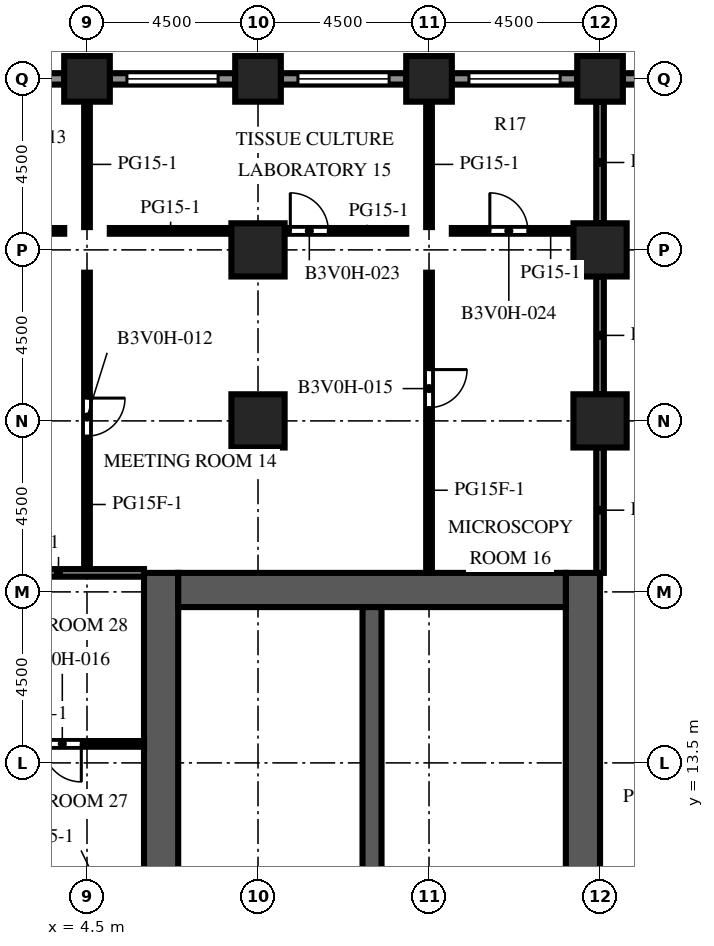
"""IFC4 building model, lengths in metres.
Left out: names, types, materials, properties, quantities, classifications, styles, units other than length and angle.
Written with IfcOpenShell. Run it as: python <this file> out.ifc"""

import sys

from ifc_helpers import new_model, si_unit, direction, frame, frame_2d, origin, origin_2d, place, context, subcontext, project, spatial, rectangle, extrude, element, fill, save


model = new_model("IFC4")
c1 = context("Model", 3, precision=1e-05, world=origin(), true_north=direction((0.0, 1.0)))
c2 = subcontext(c1, "Body", "Model", "MODEL_VIEW")
j1 = project(units=[si_unit("LENGTHUNIT", "METRE"), si_unit("PLANEANGLEUNIT", "RADIAN")], contexts=[c1])
p1 = place(None, origin())
s1 = spatial("IfcSite", under=j1, at=p1, CompositionType="ELEMENT")
p2 = place(p1, origin())
s2 = spatial("IfcBuilding", under=s1, at=p2, CompositionType="ELEMENT")
p3 = place(p2, frame((0.0, 0.0, 82.0)))
s3 = spatial("IfcBuildingStorey", under=s2, at=p3, CompositionType="ELEMENT", Elevation=82.0)
for number, where, z_axis, x_axis in (
    (1, (4.5, 31.5, -0.45), (0.0, 0.0, 1.0), (1.0, 0.0, 0.0)),
    (2, (9.0, 31.5, -0.45), (0.0, 0.0, 1.0), (1.0, 0.0, 0.0)),
    (3, (13.5, 31.5, -0.45), (0.0, 0.0, 1.0), (1.0, 0.0, 0.0)),
    (4, (18.0, 31.5, -0.45), (0.0, 0.0, 1.0), (1.0, 0.0, 0.0)),
):
    element("IfcColumn", number, at=place(p3, frame(where, z_axis=z_axis, x_axis=x_axis)), inside=s3, PredefinedType="COLUMN", context=c2, shape_type="SweptSolid", body=[
        extrude(rectangle(XDim=1.2, YDim=1.2, at=origin_2d()), origin(), (0.0, 0.0, 1.0), 4.55),
    ])
for number, where, z_axis, x_axis in (
    (5, (9.0, 22.5, -0.45), (0.0, 0.0, 1.0), (1.0, 0.0, 0.0)),
    (6, (9.0, 27.0, -0.45), (0.0, 0.0, 1.0), (1.0, 0.0, 0.0)),
    (7, (18.0, 22.5, -0.45), (0.0, 0.0, 1.0), (1.0, 0.0, 0.0)),
    (8, (18.0, 27.0, -0.45), (0.0, 0.0, 1.0), (1.0, 0.0, 0.0)),
):
    element("IfcColumn", number, at=place(p3, frame(where, z_axis=z_axis, x_axis=x_axis)), inside=s3, PredefinedType="COLUMN", context=c2, shape_type="SweptSolid", body=[
        extrude(rectangle(XDim=1.4, YDim=1.4, at=origin_2d()), origin(), (0.0, 0.0, 1.0), 4.55),
    ])
p4 = place(p3, frame((6.45, -9.0, 0.0), z_axis=(0.0, 0.0, 1.0), x_axis=(0.0, 1.0, 0.0)))
e9 = element("IfcWall", 9, at=p4, inside=s3, PredefinedType="SHEAR", context=c2, shape_type="SweptSolid", body=[
    extrude(rectangle(XDim=27.5, YDim=0.9, at=frame_2d((13.75, 0.0))), origin(), (0.0, 0.0, 1.0), 4.1),
])
p5 = place(p4, frame((12.55, 0.0, 0.0)))
e10 = element("IfcOpeningElement", 10, at=p5, cuts=e9, PredefinedType="OPENING", context=c2, shape_type="SweptSolid", body=[
    extrude(rectangle(XDim=2.4, YDim=2.4, at=frame_2d((1.2, 1.2))), frame((0.0, 0.46, 0.0), z_axis=(0.0, -1.0, 0.0), x_axis=(1.0, 0.0, 0.0)), (0.0, 0.0, 1.0), 0.92),
])
p6 = place(p4, frame((5.445, 0.0, 0.0)))
e11 = element("IfcOpeningElement", 11, at=p6, cuts=e9, PredefinedType="OPENING", context=c2, shape_type="SweptSolid", body=[
    extrude(rectangle(XDim=1.2, YDim=2.1, at=frame_2d((0.6, 1.05))), frame((0.0, 0.46, 0.0), z_axis=(0.0, -1.0, 0.0), x_axis=(1.0, 0.0, 0.0)), (0.0, 0.0, 1.0), 0.92),
])
p7 = place(p4, frame((19.485, 0.0, 0.0)))
e12 = element("IfcOpeningElement", 12, at=p7, cuts=e9, PredefinedType="OPENING", context=c2, shape_type="SweptSolid", body=[
    extrude(rectangle(XDim=1.0, YDim=2.1, at=frame_2d((0.5, 1.05))), frame((0.0, 0.46, 0.0), z_axis=(0.0, -1.0, 0.0), x_axis=(1.0, 0.0, 0.0)), (0.0, 0.0, 1.0), 0.92),
])
p8 = place(p4, frame((21.139, 0.0, 0.0)))
e13 = element("IfcOpeningElement", 13, at=p8, cuts=e9, PredefinedType="OPENING", context=c2, shape_type="SweptSolid", body=[
    extrude(rectangle(XDim=1.0, YDim=2.1, at=frame_2d((0.5, 1.05))), frame((0.0, 0.46, 0.0), z_axis=(0.0, -1.0, 0.0), x_axis=(1.0, 0.0, 0.0)), (0.0, 0.0, 1.0), 0.92),
])
p9 = place(p4, frame((23.16, 0.0, 0.0)))
e14 = element("IfcOpeningElement", 14, at=p9, cuts=e9, PredefinedType="OPENING", context=c2, shape_type="SweptSolid", body=[
    extrude(rectangle(XDim=1.0, YDim=2.1, at=frame_2d((0.5, 1.05))), frame((0.0, 0.46, 0.0), z_axis=(0.0, -1.0, 0.0), x_axis=(1.0, 0.0, 0.0)), (0.0, 0.0, 1.0), 0.92),
])
p10 = place(p4, frame((25.181, 0.0, 0.0)))
e15 = element("IfcOpeningElement", 15, at=p10, cuts=e9, PredefinedType="OPENING", context=c2, shape_type="SweptSolid", body=[
    extrude(rectangle(XDim=1.0, YDim=2.1, at=frame_2d((0.5, 1.05))), frame((0.0, 0.46, 0.0), z_axis=(0.0, -1.0, 0.0), x_axis=(1.0, 0.0, 0.0)), (0.0, 0.0, 1.0), 0.92),
])
p11 = place(p3, frame((17.55, -9.0, 0.0), z_axis=(0.0, 0.0, 1.0), x_axis=(0.0, 1.0, 0.0)))
e16 = element("IfcWall", 16, at=p11, inside=s3, PredefinedType="SHEAR", context=c2, shape_type="SweptSolid", body=[
    extrude(rectangle(XDim=27.5, YDim=0.9, at=frame_2d((13.75, 0.0))), origin(), (0.0, 0.0, 1.0), 4.1),
])
p12 = place(p11, frame((12.55, 0.0, 0.0)))
e17 = element("IfcOpeningElement", 17, at=p12, cuts=e16, PredefinedType="OPENING", context=c2, shape_type="SweptSolid", body=[
    extrude(rectangle(XDim=2.4, YDim=2.4, at=frame_2d((1.2, 1.2))), frame((0.0, 0.46, 0.0), z_axis=(0.0, -1.0, 0.0), x_axis=(1.0, 0.0, 0.0)), (0.0, 0.0, 1.0), 0.92),
])
p13 = place(p11, frame((6.825, 0.0, 0.0)))
e18 = element("IfcOpeningElement", 18, at=p13, cuts=e16, PredefinedType="OPENING", context=c2, shape_type="SweptSolid", body=[
    extrude(rectangle(XDim=1.2, YDim=2.1, at=frame_2d((0.6, 1.05))), frame((0.0, 0.46, 0.0), z_axis=(0.0, -1.0, 0.0), x_axis=(1.0, 0.0, 0.0)), (0.0, 0.0, 1.0), 0.92),
])
p14 = place(p11, frame((19.475, 0.0, 0.0)))
e19 = element("IfcOpeningElement", 19, at=p14, cuts=e16, PredefinedType="OPENING", context=c2, shape_type="SweptSolid", body=[
    extrude(rectangle(XDim=1.2, YDim=2.1, at=frame_2d((0.6, 1.05))), frame((0.0, 0.46, 0.0), z_axis=(0.0, -1.0, 0.0), x_axis=(1.0, 0.0, 0.0)), (0.0, 0.0, 1.0), 0.92),
])
p15 = place(p3, frame((6.9, 18.05, 0.0), z_axis=(0.0, 0.0, 1.0), x_axis=(1.0, 0.0, 0.0)))
e20 = element("IfcWall", 20, at=p15, inside=s3, PredefinedType="SHEAR", context=c2, shape_type="SweptSolid", body=[
    extrude(rectangle(XDim=10.2, YDim=0.9, at=frame_2d((5.1, 0.0))), origin(), (0.0, 0.0, 1.0), 4.1),
])
p16 = place(p3, frame((12.0, 10.25, 0.0), z_axis=(0.0, 0.0, 1.0), x_axis=(0.0, 1.0, 0.0)))
e21 = element("IfcWall", 21, at=p16, inside=s3, PredefinedType="SHEAR", context=c2, shape_type="SweptSolid", body=[
    extrude(rectangle(XDim=7.35, YDim=0.5, at=frame_2d((3.675, 0.0))), origin(), (0.0, 0.0, 1.0), 4.1),
])
p17 = place(p3, frame((18.6, 31.5, 0.0), z_axis=(0.0, 0.0, 1.0), x_axis=(1.0, 0.0, 0.0)))
e22 = element("IfcWall", 22, at=p17, inside=s3, PredefinedType="SOLIDWALL", context=c2, shape_type="SweptSolid", body=[
    extrude(rectangle(XDim=3.3, YDim=0.3, at=frame_2d((1.65, 0.0))), origin(), (0.0, 0.0, 1.0), 2.75),
])
p18 = place(p17, frame((1.15, 0.0, 0.0)))
e23 = element("IfcOpeningElement", 23, at=p18, cuts=e22, PredefinedType="OPENING", context=c2, shape_type="SweptSolid", body=[
    extrude(rectangle(XDim=1.0, YDim=2.2, at=frame_2d((0.5, 1.1))), frame((0.0, 0.16, 0.0), z_axis=(0.0, -1.0, 0.0), x_axis=(1.0, 0.0, 0.0)), (0.0, 0.0, 1.0), 0.32),
])
p19 = place(p3, frame((14.1, 31.5, 0.0), z_axis=(0.0, 0.0, 1.0), x_axis=(1.0, 0.0, 0.0)))
e24 = element("IfcWall", 24, at=p19, inside=s3, PredefinedType="SOLIDWALL", context=c2, shape_type="SweptSolid", body=[
    extrude(rectangle(XDim=3.3, YDim=0.3, at=frame_2d((1.65, 0.0))), origin(), (0.0, 0.0, 1.0), 2.75),
])
p20 = place(p19, frame((0.45, 0.0, 0.8)))
e25 = element("IfcOpeningElement", 25, at=p20, cuts=e24, PredefinedType="OPENING", context=c2, shape_type="SweptSolid", body=[
    extrude(rectangle(XDim=2.4, YDim=1.7, at=frame_2d((1.2, 0.85))), frame((0.0, 0.16, 0.0), z_axis=(0.0, -1.0, 0.0), x_axis=(1.0, 0.0, 0.0)), (0.0, 0.0, 1.0), 0.32),
])
p21 = place(p3, frame((9.6, 31.5, 0.0), z_axis=(0.0, 0.0, 1.0), x_axis=(1.0, 0.0, 0.0)))
e26 = element("IfcWall", 26, at=p21, inside=s3, PredefinedType="SOLIDWALL", context=c2, shape_type="SweptSolid", body=[
    extrude(rectangle(XDim=3.3, YDim=0.3, at=frame_2d((1.65, 0.0))), origin(), (0.0, 0.0, 1.0), 2.75),
])
p22 = place(p21, frame((0.45, 0.0, 0.8)))
e27 = element("IfcOpeningElement", 27, at=p22, cuts=e26, PredefinedType="OPENING", context=c2, shape_type="SweptSolid", body=[
    extrude(rectangle(XDim=2.4, YDim=1.7, at=frame_2d((1.2, 0.85))), frame((0.0, 0.16, 0.0), z_axis=(0.0, -1.0, 0.0), x_axis=(1.0, 0.0, 0.0)), (0.0, 0.0, 1.0), 0.32),
])
p23 = place(p3, frame((5.1, 31.5, 0.0), z_axis=(0.0, 0.0, 1.0), x_axis=(1.0, 0.0, 0.0)))
e28 = element("IfcWall", 28, at=p23, inside=s3, PredefinedType="SOLIDWALL", context=c2, shape_type="SweptSolid", body=[
    extrude(rectangle(XDim=3.3, YDim=0.3, at=frame_2d((1.65, 0.0))), origin(), (0.0, 0.0, 1.0), 2.75),
])
p24 = place(p23, frame((0.45, 0.0, 0.8)))
e29 = element("IfcOpeningElement", 29, at=p24, cuts=e28, PredefinedType="OPENING", context=c2, shape_type="SweptSolid", body=[
    extrude(rectangle(XDim=2.4, YDim=1.7, at=frame_2d((1.2, 0.85))), frame((0.0, 0.16, 0.0), z_axis=(0.0, -1.0, 0.0), x_axis=(1.0, 0.0, 0.0)), (0.0, 0.0, 1.0), 0.32),
])
p25 = place(p3, frame((0.6, 31.5, 0.0), z_axis=(0.0, 0.0, 1.0), x_axis=(1.0, 0.0, 0.0)))
e30 = element("IfcWall", 30, at=p25, inside=s3, PredefinedType="SOLIDWALL", context=c2, shape_type="SweptSolid", body=[
    extrude(rectangle(XDim=3.3, YDim=0.3, at=frame_2d((1.65, 0.0))), origin(), (0.0, 0.0, 1.0), 2.75),
])
p26 = place(p25, frame((0.45, 0.0, 0.8)))
e31 = element("IfcOpeningElement", 31, at=p26, cuts=e30, PredefinedType="OPENING", context=c2, shape_type="SweptSolid", body=[
    extrude(rectangle(XDim=2.4, YDim=1.7, at=frame_2d((1.2, 0.85))), frame((0.0, 0.16, 0.0), z_axis=(0.0, -1.0, 0.0), x_axis=(1.0, 0.0, 0.0)), (0.0, 0.0, 1.0), 0.32),
])
for number, where, z_axis, x_axis in (
    (32, (6.9, 11.72, 0.0), (0.0, 0.0, 1.0), (1.0, 0.0, 0.0)),
    (33, (6.9, 13.558, 0.0), (0.0, 0.0, 1.0), (1.0, 0.0, 0.0)),
    (34, (6.9, 15.762, 0.0), (0.0, 0.0, 1.0), (1.0, 0.0, 0.0)),
):
    element("IfcWall", number, at=place(p3, frame(where, z_axis=z_axis, x_axis=x_axis)), inside=s3, PredefinedType="PARTITIONING", context=c2, shape_type="SweptSolid", body=[
        extrude(rectangle(XDim=4.85, YDim=0.1, at=frame_2d((2.425, 0.0))), origin(), (0.0, 0.0, 1.0), 3.65),
    ])
p27 = place(p3, frame((4.5, 26.4, 0.0), z_axis=(0.0, 0.0, 1.0), x_axis=(0.0, -1.0, 0.0)))
e35 = element("IfcWall", 35, at=p27, inside=s3, PredefinedType="PARTITIONING", context=c2, shape_type="SweptSolid", body=[
    extrude(rectangle(XDim=7.9, YDim=0.15, at=frame_2d((3.95, 0.0))), origin(), (0.0, 0.0, 1.0), 3.65),
])
p28 = place(p27, frame((3.3, 0.0, 0.0)))
e36 = element("IfcOpeningElement", 36, at=p28, cuts=e35, PredefinedType="OPENING", context=c2, shape_type="SweptSolid", body=[
    extrude(rectangle(XDim=1.0, YDim=2.1, at=frame_2d((0.5, 1.05))), frame((0.0, 0.085, 0.0), z_axis=(0.0, -1.0, 0.0), x_axis=(1.0, 0.0, 0.0)), (0.0, 0.0, 1.0), 0.17),
])
p29 = place(p3, frame((4.5, 27.6, 0.0), z_axis=(0.0, 0.0, 1.0), x_axis=(0.0, 1.0, 0.0)))
e37 = element("IfcWall", 37, at=p29, inside=s3, PredefinedType="PARTITIONING", context=c2, shape_type="SweptSolid", body=[
    extrude(rectangle(XDim=3.3, YDim=0.15, at=frame_2d((1.65, 0.0))), origin(), (0.0, 0.0, 1.0), 3.65),
])
p30 = place(p3, frame((13.5, 26.4, 0.0), z_axis=(0.0, 0.0, 1.0), x_axis=(0.0, -1.0, 0.0)))
e38 = element("IfcWall", 38, at=p30, inside=s3, PredefinedType="PARTITIONING", context=c2, shape_type="SweptSolid", body=[
    extrude(rectangle(XDim=7.9, YDim=0.15, at=frame_2d((3.95, 0.0))), origin(), (0.0, 0.0, 1.0), 3.65),
])
p31 = place(p30, frame((2.55, 0.0, 0.0)))
e39 = element("IfcOpeningElement", 39, at=p31, cuts=e38, PredefinedType="OPENING", context=c2, shape_type="SweptSolid", body=[
    extrude(rectangle(XDim=1.0, YDim=2.1, at=frame_2d((0.5, 1.05))), frame((0.0, 0.085, 0.0), z_axis=(0.0, -1.0, 0.0), x_axis=(1.0, 0.0, 0.0)), (0.0, 0.0, 1.0), 0.17),
])
p32 = place(p3, frame((13.5, 27.6, 0.0), z_axis=(0.0, 0.0, 1.0), x_axis=(0.0, 1.0, 0.0)))
e40 = element("IfcWall", 40, at=p32, inside=s3, PredefinedType="PARTITIONING", context=c2, shape_type="SweptSolid", body=[
    extrude(rectangle(XDim=3.3, YDim=0.15, at=frame_2d((1.65, 0.0))), origin(), (0.0, 0.0, 1.0), 3.65),
])
p33 = place(p3, frame((18.0, 18.5, 0.0), z_axis=(0.0, 0.0, 1.0), x_axis=(0.0, 1.0, 0.0)))
e41 = element("IfcWall", 41, at=p33, inside=s3, PredefinedType="PARTITIONING", context=c2, shape_type="SweptSolid", body=[
    extrude(rectangle(XDim=3.3, YDim=0.2, at=frame_2d((1.65, 0.0))), origin(), (0.0, 0.0, 1.0), 3.65),
])
p34 = place(p3, frame((18.0, 23.2, 0.0), z_axis=(0.0, 0.0, 1.0), x_axis=(0.0, 1.0, 0.0)))
e42 = element("IfcWall", 42, at=p34, inside=s3, PredefinedType="PARTITIONING", context=c2, shape_type="SweptSolid", body=[
    extrude(rectangle(XDim=3.1, YDim=0.2, at=frame_2d((1.55, 0.0))), origin(), (0.0, 0.0, 1.0), 3.65),
])
p35 = place(p3, frame((18.0, 27.7, 0.0), z_axis=(0.0, 0.0, 1.0), x_axis=(0.0, 1.0, 0.0)))
e43 = element("IfcWall", 43, at=p35, inside=s3, PredefinedType="PARTITIONING", context=c2, shape_type="SweptSolid", body=[
    extrude(rectangle(XDim=3.2, YDim=0.2, at=frame_2d((1.6, 0.0))), origin(), (0.0, 0.0, 1.0), 3.65),
])
p36 = place(p3, frame((1.5, 14.0, 0.0), z_axis=(0.0, 0.0, 1.0), x_axis=(1.0, 0.0, 0.0)))
e44 = element("IfcWall", 44, at=p36, inside=s3, PredefinedType="PARTITIONING", context=c2, shape_type="SweptSolid", body=[
    extrude(rectangle(XDim=4.5, YDim=0.15, at=frame_2d((2.25, 0.0))), origin(), (0.0, 0.0, 1.0), 3.65),
])
p37 = place(p36, frame((1.85, 0.0, 0.0)))
e45 = element("IfcOpeningElement", 45, at=p37, cuts=e44, PredefinedType="OPENING", context=c2, shape_type="SweptSolid", body=[
    extrude(rectangle(XDim=1.0, YDim=2.1, at=frame_2d((0.5, 1.05))), frame((0.0, 0.085, 0.0), z_axis=(0.0, -1.0, 0.0), x_axis=(1.0, 0.0, 0.0)), (0.0, 0.0, 1.0), 0.17),
])
p38 = place(p3, frame((1.5, 18.5, 0.0), z_axis=(0.0, 0.0, 1.0), x_axis=(1.0, 0.0, 0.0)))
e46 = element("IfcWall", 46, at=p38, inside=s3, PredefinedType="PARTITIONING", context=c2, shape_type="SweptSolid", body=[
    extrude(rectangle(XDim=4.5, YDim=0.2, at=frame_2d((2.25, 0.0))), origin(), (0.0, 0.0, 1.0), 3.65),
])
for number, where, z_axis, x_axis in (
    (47, (0.7, 27.5, 0.0), (0.0, 0.0, 1.0), (1.0, 0.0, 0.0)),
    (48, (5.1, 27.5, 0.0), (0.0, 0.0, 1.0), (1.0, 0.0, 0.0)),
):
    element("IfcWall", number, at=place(p3, frame(where, z_axis=z_axis, x_axis=x_axis)), inside=s3, PredefinedType="PARTITIONING", context=c2, shape_type="SweptSolid", body=[
        extrude(rectangle(XDim=3.2, YDim=0.15, at=frame_2d((1.6, 0.0))), origin(), (0.0, 0.0, 1.0), 3.65),
    ])
p39 = place(p3, frame((9.7, 27.5, 0.0), z_axis=(0.0, 0.0, 1.0), x_axis=(1.0, 0.0, 0.0)))
e49 = element("IfcWall", 49, at=p39, inside=s3, PredefinedType="PARTITIONING", context=c2, shape_type="SweptSolid", body=[
    extrude(rectangle(XDim=3.2, YDim=0.15, at=frame_2d((1.6, 0.0))), origin(), (0.0, 0.0, 1.0), 3.65),
])
p40 = place(p39, frame((0.15, 0.0, 0.0)))
e50 = element("IfcOpeningElement", 50, at=p40, cuts=e49, PredefinedType="OPENING", context=c2, shape_type="SweptSolid", body=[
    extrude(rectangle(XDim=1.0, YDim=2.1, at=frame_2d((0.5, 1.05))), frame((0.0, 0.085, 0.0), z_axis=(0.0, -1.0, 0.0), x_axis=(1.0, 0.0, 0.0)), (0.0, 0.0, 1.0), 0.17),
])
p41 = place(p3, frame((14.1, 27.5, 0.0), z_axis=(0.0, 0.0, 1.0), x_axis=(1.0, 0.0, 0.0)))
e51 = element("IfcWall", 51, at=p41, inside=s3, PredefinedType="PARTITIONING", context=c2, shape_type="SweptSolid", body=[
    extrude(rectangle(XDim=3.2, YDim=0.15, at=frame_2d((1.6, 0.0))), origin(), (0.0, 0.0, 1.0), 3.65),
])
p42 = place(p41, frame((1.0, 0.0, 0.0)))
e52 = element("IfcOpeningElement", 52, at=p42, cuts=e51, PredefinedType="OPENING", context=c2, shape_type="SweptSolid", body=[
    extrude(rectangle(XDim=1.0, YDim=2.1, at=frame_2d((0.5, 1.05))), frame((0.0, 0.085, 0.0), z_axis=(0.0, -1.0, 0.0), x_axis=(1.0, 0.0, 0.0)), (0.0, 0.0, 1.0), 0.17),
])
p43 = place(p20, origin())
e53 = element("IfcWindow", 53, at=p43, inside=s3, PartitioningType="SINGLE_PANEL", PredefinedType="WINDOW", context=c2, shape_type="SweptSolid", body=[
    extrude(rectangle(XDim=2.4, YDim=1.7, at=frame_2d((1.2, 0.85))), frame((0.0, 0.03, 0.0), z_axis=(0.0, -1.0, 0.0), x_axis=(1.0, 0.0, 0.0)), (0.0, 0.0, 1.0), 0.06),
])
fill(e25, e53)
p44 = place(p22, origin())
e54 = element("IfcWindow", 54, at=p44, inside=s3, PartitioningType="SINGLE_PANEL", PredefinedType="WINDOW", context=c2, shape_type="SweptSolid", body=[
    extrude(rectangle(XDim=2.4, YDim=1.7, at=frame_2d((1.2, 0.85))), frame((0.0, 0.03, 0.0), z_axis=(0.0, -1.0, 0.0), x_axis=(1.0, 0.0, 0.0)), (0.0, 0.0, 1.0), 0.06),
])
fill(e27, e54)
p45 = place(p24, origin())
e55 = element("IfcWindow", 55, at=p45, inside=s3, PartitioningType="SINGLE_PANEL", PredefinedType="WINDOW", context=c2, shape_type="SweptSolid", body=[
    extrude(rectangle(XDim=2.4, YDim=1.7, at=frame_2d((1.2, 0.85))), frame((0.0, 0.03, 0.0), z_axis=(0.0, -1.0, 0.0), x_axis=(1.0, 0.0, 0.0)), (0.0, 0.0, 1.0), 0.06),
])
fill(e29, e55)
p46 = place(p14, frame((1.2, 0.0, 0.0), z_axis=(0.0, 0.0, 1.0), x_axis=(-1.0, 0.0, 0.0)))
e56 = element("IfcDoor", 56, at=p46, inside=s3, OperationType="SINGLE_SWING_LEFT", PredefinedType="DOOR", context=c2, shape_type="SweptSolid", body=[
    extrude(rectangle(XDim=1.2, YDim=2.1, at=frame_2d((0.6, 1.05))), frame((0.0, 0.025, 0.0), z_axis=(0.0, -1.0, 0.0), x_axis=(1.0, 0.0, 0.0)), (0.0, 0.0, 1.0), 0.05),
])
fill(e19, e56)
p47 = place(p7, origin())
e57 = element("IfcDoor", 57, at=p47, inside=s3, OperationType="SINGLE_SWING_RIGHT", PredefinedType="DOOR", context=c2, shape_type="SweptSolid", body=[
    extrude(rectangle(XDim=1.0, YDim=2.1, at=frame_2d((0.5, 1.05))), frame((0.0, -0.375, 0.0), z_axis=(0.0, -1.0, 0.0), x_axis=(1.0, 0.0, 0.0)), (0.0, 0.0, 1.0), 0.05),
])
fill(e12, e57)
p48 = place(p8, origin())
e58 = element("IfcDoor", 58, at=p48, inside=s3, OperationType="SINGLE_SWING_LEFT", PredefinedType="DOOR", context=c2, shape_type="SweptSolid", body=[
    extrude(rectangle(XDim=1.0, YDim=2.1, at=frame_2d((0.5, 1.05))), frame((0.0, -0.375, 0.0), z_axis=(0.0, -1.0, 0.0), x_axis=(1.0, 0.0, 0.0)), (0.0, 0.0, 1.0), 0.05),
])
fill(e13, e58)
p49 = place(p9, origin())
e59 = element("IfcDoor", 59, at=p49, inside=s3, OperationType="SINGLE_SWING_RIGHT", PredefinedType="DOOR", context=c2, shape_type="SweptSolid", body=[
    extrude(rectangle(XDim=1.0, YDim=2.1, at=frame_2d((0.5, 1.05))), frame((0.0, -0.375, 0.0), z_axis=(0.0, -1.0, 0.0), x_axis=(1.0, 0.0, 0.0)), (0.0, 0.0, 1.0), 0.05),
])
fill(e14, e59)
p50 = place(p10, origin())
e60 = element("IfcDoor", 60, at=p50, inside=s3, OperationType="SINGLE_SWING_LEFT", PredefinedType="DOOR", context=c2, shape_type="SweptSolid", body=[
    extrude(rectangle(XDim=1.0, YDim=2.1, at=frame_2d((0.5, 1.05))), frame((0.0, -0.375, 0.0), z_axis=(0.0, -1.0, 0.0), x_axis=(1.0, 0.0, 0.0)), (0.0, 0.0, 1.0), 0.05),
])
fill(e15, e60)
p51 = place(p28, origin())
e61 = element("IfcDoor", 61, at=p51, inside=s3, OperationType="SINGLE_SWING_LEFT", PredefinedType="DOOR", context=c2, shape_type="SweptSolid", body=[
    extrude(rectangle(XDim=1.0, YDim=2.1, at=frame_2d((0.5, 1.05))), frame((0.0, 0.025, 0.0), z_axis=(0.0, -1.0, 0.0), x_axis=(1.0, 0.0, 0.0)), (0.0, 0.0, 1.0), 0.05),
])
fill(e36, e61)
p52 = place(p31, origin())
e62 = element("IfcDoor", 62, at=p52, inside=s3, OperationType="SINGLE_SWING_LEFT", PredefinedType="DOOR", context=c2, shape_type="SweptSolid", body=[
    extrude(rectangle(XDim=1.0, YDim=2.1, at=frame_2d((0.5, 1.05))), frame((0.0, 0.025, 0.0), z_axis=(0.0, -1.0, 0.0), x_axis=(1.0, 0.0, 0.0)), (0.0, 0.0, 1.0), 0.05),
])
fill(e39, e62)
p53 = place(p37, origin())
e63 = element("IfcDoor", 63, at=p53, inside=s3, OperationType="SINGLE_SWING_RIGHT", PredefinedType="DOOR", context=c2, shape_type="SweptSolid", body=[
    extrude(rectangle(XDim=1.0, YDim=2.1, at=frame_2d((0.5, 1.05))), frame((0.0, 0.025, 0.0), z_axis=(0.0, -1.0, 0.0), x_axis=(1.0, 0.0, 0.0)), (0.0, 0.0, 1.0), 0.05),
])
fill(e45, e63)
p54 = place(p40, origin())
e64 = element("IfcDoor", 64, at=p54, inside=s3, OperationType="SINGLE_SWING_LEFT", PredefinedType="DOOR", context=c2, shape_type="SweptSolid", body=[
    extrude(rectangle(XDim=1.0, YDim=2.1, at=frame_2d((0.5, 1.05))), frame((0.0, 0.025, 0.0), z_axis=(0.0, -1.0, 0.0), x_axis=(1.0, 0.0, 0.0)), (0.0, 0.0, 1.0), 0.05),
])
fill(e50, e64)
p55 = place(p42, origin())
e65 = element("IfcDoor", 65, at=p55, inside=s3, OperationType="SINGLE_SWING_LEFT", PredefinedType="DOOR", context=c2, shape_type="SweptSolid", body=[
    extrude(rectangle(XDim=1.0, YDim=2.1, at=frame_2d((0.5, 1.05))), frame((0.0, 0.025, 0.0), z_axis=(0.0, -1.0, 0.0), x_axis=(1.0, 0.0, 0.0)), (0.0, 0.0, 1.0), 0.05),
])
fill(e52, e65)
save(model, sys.argv[1])
